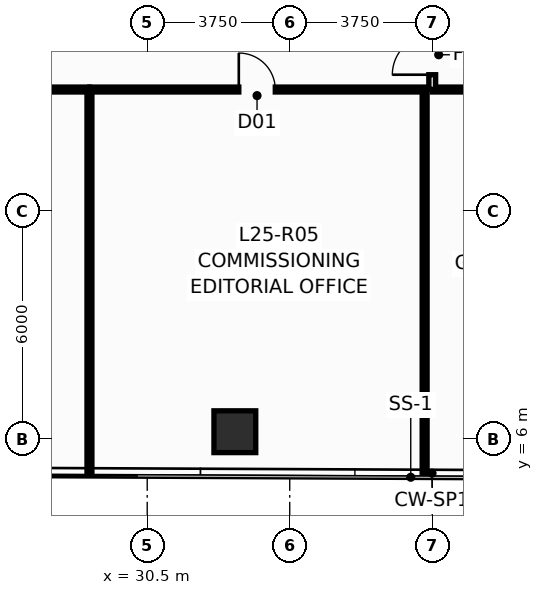
"""IFC4 building model, lengths in metres.
Left out: names, types, materials, properties, quantities, classifications, styles, units other than length and angle.
Written with IfcOpenShell. Run it as: python <this file> out.ifc"""

import sys

from ifc_helpers import new_model, si_unit, direction, frame, frame_2d, origin, origin_2d, place, context, subcontext, project, spatial, rectangle, hollow_rectangle, extrude, source, transform, mapped, element, fill, save


model = new_model("IFC4")
c1 = context("Model", 3, precision=1e-05, world=origin(), true_north=direction((0.0, 1.0)))
c2 = subcontext(c1, "Body", "Model", "MODEL_VIEW")
j1 = project(units=[si_unit("LENGTHUNIT", "METRE"), si_unit("PLANEANGLEUNIT", "RADIAN")], contexts=[c1])
p1 = place(None, origin())
s1 = spatial("IfcSite", under=j1, at=p1, CompositionType="ELEMENT")
p2 = place(p1, origin())
s2 = spatial("IfcBuilding", under=s1, at=p2, CompositionType="ELEMENT")
p3 = place(p2, frame((0.0, 0.0, 98.1)))
s3 = spatial("IfcBuildingStorey", under=s2, at=p3, CompositionType="ELEMENT", Elevation=98.1)
m1 = source(origin(), c2, "Body", "SweptSolid", [
    extrude(hollow_rectangle(XDim=1.1, YDim=1.1, WallThickness=0.06, at=origin_2d()), origin(), (0.0, 0.0, 1.0), 3.651),
])
p4 = place(p3, frame((32.806, 6.196, 0.0), z_axis=(-0.004413801811, 0.019862108152, 0.999792986079), x_axis=(-0.976187060184, -0.216930457819, 0.0)))
e1 = element("IfcColumn", 1, at=p4, inside=s3, PredefinedType="COLUMN", context=c2, shape_type="MappedRepresentation", body=[
    mapped(m1, transform((0.0, 0.0, 0.0), scale=1.0)),
])
p5 = place(p3, frame((37.8, 5.101, 0.0), z_axis=(0.0, 0.0, 1.0), x_axis=(0.0, 1.0, 0.0)))
e2 = element("IfcWall", 2, at=p5, inside=s3, PredefinedType="PARTITIONING", context=c2, shape_type="SweptSolid", body=[
    extrude(rectangle(XDim=10.094, YDim=0.13, at=frame_2d((5.047, 0.0))), origin(), (0.0, 0.0, 1.0), 3.4),
])
p6 = place(p3, frame((28.98, 5.141, 0.0), z_axis=(0.0, 0.0, 1.0), x_axis=(0.0, 1.0, 0.0)))
e3 = element("IfcWall", 3, at=p6, inside=s3, PredefinedType="PARTITIONING", context=c2, shape_type="SweptSolid", body=[
    extrude(rectangle(XDim=10.054, YDim=0.13, at=frame_2d((5.027, 0.0))), origin(), (0.0, 0.0, 1.0), 3.4),
])
p7 = place(p3, frame((28.985, 15.2, 0.0), z_axis=(0.0, 0.0, 1.0), x_axis=(1.0, 0.0, 0.0)))
e4 = element("IfcWall", 4, at=p7, inside=s3, PredefinedType="PARTITIONING", context=c2, shape_type="SweptSolid", body=[
    extrude(rectangle(XDim=8.81, YDim=0.13, at=frame_2d((4.405, 0.0))), origin(), (0.0, 0.0, 1.0), 3.4),
])
p8 = place(p7, frame((3.925, 0.0, 0.0)))
e5 = element("IfcOpeningElement", 5, at=p8, cuts=e4, PredefinedType="OPENING", context=c2, shape_type="SweptSolid", body=[
    extrude(rectangle(XDim=0.96, YDim=2.15, at=frame_2d((0.48, 1.075))), frame((0.0, 0.077, 0.0), z_axis=(0.0, -1.0, 0.0), x_axis=(1.0, 0.0, 0.0)), (0.0, 0.0, 1.0), 0.154),
])
p9 = place(p3, frame((20.175, 15.2, 0.0), z_axis=(0.0, 0.0, 1.0), x_axis=(1.0, 0.0, 0.0)))
e6 = element("IfcWall", 6, at=p9, inside=s3, PredefinedType="PARTITIONING", context=c2, shape_type="SweptSolid", body=[
    extrude(rectangle(XDim=8.8, YDim=0.13, at=frame_2d((4.4, 0.0))), origin(), (0.0, 0.0, 1.0), 3.4),
])
p10 = place(p9, frame((3.92, 0.0, 0.0)))
e7 = element("IfcOpeningElement", 7, at=p10, cuts=e6, PredefinedType="OPENING", context=c2, shape_type="SweptSolid", body=[
    extrude(rectangle(XDim=0.96, YDim=2.15, at=frame_2d((0.48, 1.075))), frame((0.0, 0.077, 0.0), z_axis=(0.0, -1.0, 0.0), x_axis=(1.0, 0.0, 0.0)), (0.0, 0.0, 1.0), 0.154),
])
p11 = place(p3, frame((38.005, 15.2, 0.0), z_axis=(0.0, 0.0, 1.0), x_axis=(1.0, 0.0, 0.0)))
e8 = element("IfcWall", 8, at=p11, inside=s3, PredefinedType="PARTITIONING", context=c2, shape_type="SweptSolid", body=[
    extrude(rectangle(XDim=8.6, YDim=0.13, at=frame_2d((4.3, 0.0))), origin(), (0.0, 0.0, 1.0), 3.4),
])
p12 = place(p11, frame((3.82, 0.0, 0.0)))
e9 = element("IfcOpeningElement", 9, at=p12, cuts=e8, PredefinedType="OPENING", context=c2, shape_type="SweptSolid", body=[
    extrude(rectangle(XDim=0.96, YDim=2.15, at=frame_2d((0.48, 1.075))), frame((0.0, 0.077, 0.0), z_axis=(0.0, -1.0, 0.0), x_axis=(1.0, 0.0, 0.0)), (0.0, 0.0, 1.0), 0.154),
])
p13 = place(p3, frame((38.0, 15.205, 0.0), z_axis=(0.0, 0.0, 1.0), x_axis=(0.0, 1.0, 0.0)))
e10 = element("IfcWall", 10, at=p13, inside=s3, PredefinedType="PARTITIONING", context=c2, shape_type="SweptSolid", body=[
    extrude(rectangle(XDim=1.82, YDim=0.18, at=frame_2d((0.91, 0.0))), origin(), (0.0, 0.0, 1.0), 3.4),
])
p14 = place(p13, frame((0.385, 0.0, 0.0)))
e11 = element("IfcOpeningElement", 11, at=p14, cuts=e10, PredefinedType="OPENING", context=c2, shape_type="SweptSolid", body=[
    extrude(rectangle(XDim=1.05, YDim=2.15, at=frame_2d((0.525, 1.075))), frame((0.0, 0.102, 0.0), z_axis=(0.0, -1.0, 0.0), x_axis=(1.0, 0.0, 0.0)), (0.0, 0.0, 1.0), 0.204),
])
p15 = place(p8, origin())
e12 = element("IfcDoor", 12, at=p15, inside=s3, OperationType="SINGLE_SWING_LEFT", PredefinedType="DOOR", context=c2, shape_type="SweptSolid", body=[
    extrude(rectangle(XDim=0.96, YDim=2.15, at=frame_2d((0.48, 1.075))), frame((0.0, 0.025, 0.0), z_axis=(0.0, -1.0, 0.0), x_axis=(1.0, 0.0, 0.0)), (0.0, 0.0, 1.0), 0.05),
])
fill(e5, e12)
p16 = place(p14, origin())
e13 = element("IfcDoor", 13, at=p16, inside=s3, OperationType="SINGLE_SWING_LEFT", PredefinedType="DOOR", context=c2, shape_type="SweptSolid", body=[
    extrude(rectangle(XDim=1.05, YDim=2.15, at=frame_2d((0.525, 1.075))), frame((0.0, 0.025, 0.0), z_axis=(0.0, -1.0, 0.0), x_axis=(1.0, 0.0, 0.0)), (0.0, 0.0, 1.0), 0.05),
])
fill(e11, e13)
save(model, sys.argv[1])
